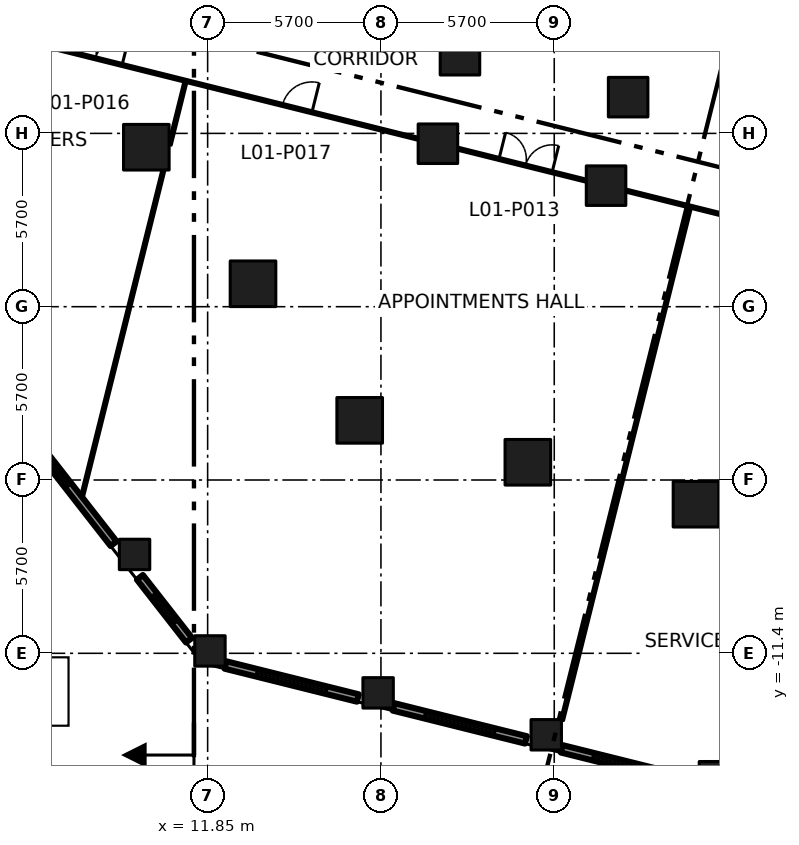
"""IFC4 building model, lengths in metres.
Left out: names, types, materials, properties, quantities, classifications, styles, units other than length and angle.
Written with IfcOpenShell. Run it as: python <this file> out.ifc"""

import sys

from ifc_helpers import new_model, si_unit, direction, frame, frame_2d, origin, origin_2d, place, context, subcontext, project, spatial, rectangle, extrude, element, fill, save


model = new_model("IFC4")
c1 = context("Model", 3, precision=1e-05, world=origin(), true_north=direction((0.0, 1.0)))
c2 = subcontext(c1, "Body", "Model", "MODEL_VIEW")
j1 = project(units=[si_unit("LENGTHUNIT", "METRE"), si_unit("PLANEANGLEUNIT", "RADIAN")], contexts=[c1])
p1 = place(None, origin())
s1 = spatial("IfcSite", under=j1, at=p1, CompositionType="ELEMENT")
p2 = place(p1, origin())
s2 = spatial("IfcBuilding", under=s1, at=p2, CompositionType="ELEMENT")
p3 = place(p2, frame((0.0, 0.0, 7.2)))
s3 = spatial("IfcBuildingStorey", under=s2, at=p3, CompositionType="ELEMENT", Elevation=7.2)
for number, where, z_axis, x_axis in (
    (1, (16.851, -3.738, 0.0), (0.0, 0.0, 1.0), (1.0, 0.0, 0.0)),
    (2, (13.342, 0.754, 0.0), (0.0, 0.0, 1.0), (1.0, 0.0, 0.0)),
    (3, (9.833, 5.245, 0.0), (0.0, 0.0, 1.0), (1.0, 0.0, 0.0)),
    (4, (22.382, -5.117, 0.0), (0.0, 0.0, 1.0), (1.0, 0.0, 0.0)),
    (5, (27.912, -6.496, 0.0), (0.0, 0.0, 1.0), (1.0, 0.0, 0.0)),
):
    element("IfcColumn", number, at=place(p3, frame(where, z_axis=z_axis, x_axis=x_axis)), inside=s3, PredefinedType="COLUMN", context=c2, shape_type="SweptSolid", body=[
        extrude(rectangle(XDim=1.5, YDim=1.5, at=origin_2d()), origin(), (0.0, 0.0, 1.0), 5.4),
    ])
for number, where, z_axis, x_axis in (
    (6, (19.424, 5.36, 0.0), (0.0, 0.0, 1.0), (1.0, 0.0, 0.0)),
    (7, (24.954, 3.981, 0.0), (0.0, 0.0, 1.0), (1.0, 0.0, 0.0)),
    (8, (20.149, 8.271, 0.0), (0.0, 0.0, 1.0), (1.0, 0.0, 0.0)),
    (9, (25.68, 6.892, 0.0), (0.0, 0.0, 1.0), (1.0, 0.0, 0.0)),
):
    element("IfcColumn", number, at=place(p3, frame(where, z_axis=z_axis, x_axis=x_axis)), inside=s3, PredefinedType="COLUMN", context=c2, shape_type="SweptSolid", body=[
        extrude(rectangle(XDim=1.3, YDim=1.3, at=origin_2d()), origin(), (0.0, 0.0, 1.0), 5.4),
    ])
for number, where, z_axis, x_axis in (
    (10, (9.446, -8.148, 0.0), (0.0, 0.0, 1.0), (1.0, 0.0, 0.0)),
    (11, (11.926, -11.322, 0.0), (0.0, 0.0, 1.0), (1.0, 0.0, 0.0)),
    (12, (17.457, -12.701, 0.0), (0.0, 0.0, 1.0), (1.0, 0.0, 0.0)),
    (13, (22.987, -14.08, 0.0), (0.0, 0.0, 1.0), (1.0, 0.0, 0.0)),
    (14, (28.518, -15.459, 0.0), (0.0, 0.0, 1.0), (1.0, 0.0, 0.0)),
):
    element("IfcColumn", number, at=place(p3, frame(where, z_axis=z_axis, x_axis=x_axis)), inside=s3, PredefinedType="COLUMN", context=c2, shape_type="SweptSolid", body=[
        extrude(rectangle(XDim=1.0, YDim=1.0, at=origin_2d()), origin(), (0.0, 0.0, 1.0), 5.4),
    ])
p4 = place(p3, frame((2.395, 9.606, 0.0), z_axis=(0.0, 0.0, 1.0), x_axis=(0.970307527636, -0.241874558011, 0.0)))
e15 = element("IfcWall", 15, at=p4, inside=s3, PredefinedType="PARTITIONING", context=c2, shape_type="SweptSolid", body=[
    extrude(rectangle(XDim=16.859, YDim=0.1, at=frame_2d((8.43, 0.0))), origin(), (0.0, 0.0, 1.0), 4.95),
])
p5 = place(p4, frame((5.045, 0.0, 0.0)))
e16 = element("IfcOpeningElement", 16, at=p5, cuts=e15, PredefinedType="OPENING", context=c2, shape_type="SweptSolid", body=[
    extrude(rectangle(XDim=1.8, YDim=2.1, at=frame_2d((0.9, 1.05))), frame((0.0, 0.06, 0.0), z_axis=(0.0, -1.0, 0.0), x_axis=(1.0, 0.0, 0.0)), (0.0, 0.0, 1.0), 0.12),
])
p6 = place(p4, frame((12.28, 0.0, 0.0)))
e17 = element("IfcOpeningElement", 17, at=p6, cuts=e15, PredefinedType="OPENING", context=c2, shape_type="SweptSolid", body=[
    extrude(rectangle(XDim=1.0, YDim=2.1, at=frame_2d((0.5, 1.05))), frame((0.0, 0.06, 0.0), z_axis=(0.0, -1.0, 0.0), x_axis=(1.0, 0.0, 0.0)), (0.0, 0.0, 1.0), 0.12),
])
p7 = place(p3, frame((20.094, 5.193, 0.0), z_axis=(0.0, 0.0, 1.0), x_axis=(0.970321828551, -0.241817181023, 0.0)))
e18 = element("IfcWall", 18, at=p7, inside=s3, PredefinedType="PARTITIONING", context=c2, shape_type="SweptSolid", body=[
    extrude(rectangle(XDim=4.318, YDim=0.1, at=frame_2d((2.159, 0.0))), origin(), (0.0, 0.0, 1.0), 4.95),
])
p8 = place(p7, frame((1.38, 0.0, 0.0)))
e19 = element("IfcOpeningElement", 19, at=p8, cuts=e18, PredefinedType="OPENING", context=c2, shape_type="SweptSolid", body=[
    extrude(rectangle(XDim=1.8, YDim=2.1, at=frame_2d((0.9, 1.05))), frame((0.0, 0.06, 0.0), z_axis=(0.0, -1.0, 0.0), x_axis=(1.0, 0.0, 0.0)), (0.0, 0.0, 1.0), 0.12),
])
p9 = place(p3, frame((25.624, 3.815, 0.0), z_axis=(0.0, 0.0, 1.0), x_axis=(0.970295255208, -0.241923784941, 0.0)))
e20 = element("IfcWall", 20, at=p9, inside=s3, PredefinedType="PARTITIONING", context=c2, shape_type="SweptSolid", body=[
    extrude(rectangle(XDim=4.319, YDim=0.1, at=frame_2d((2.16, 0.0))), origin(), (0.0, 0.0, 1.0), 4.95),
])
p10 = place(p3, frame((7.716, -6.257, 0.0), z_axis=(0.0, 0.0, 1.0), x_axis=(0.241891576484, 0.970303285177, 0.0)))
e21 = element("IfcWall", 21, at=p10, inside=s3, PredefinedType="PARTITIONING", context=c2, shape_type="SweptSolid", body=[
    extrude(rectangle(XDim=11.061, YDim=0.1, at=frame_2d((5.53, 0.0))), origin(), (0.0, 0.0, 1.0), 4.95),
])
p11 = place(p3, frame((10.603, 5.323, 0.0), z_axis=(0.0, 0.0, 1.0), x_axis=(0.241966521302, 0.970284598749, 0.0)))
e22 = element("IfcWall", 22, at=p11, inside=s3, PredefinedType="PARTITIONING", context=c2, shape_type="SweptSolid", body=[
    extrude(rectangle(XDim=2.12, YDim=0.1, at=frame_2d((1.06, 0.0))), origin(), (0.0, 0.0, 1.0), 4.95),
])
p12 = place(p3, frame((23.507, -13.601, 0.0), z_axis=(0.0, 0.0, 1.0), x_axis=(0.24198959429, 0.970278844588, 0.0)))
e23 = element("IfcWall", 23, at=p12, inside=s3, PredefinedType="PARTITIONING", context=c2, shape_type="SweptSolid", body=[
    extrude(rectangle(XDim=17.36, YDim=0.1, at=frame_2d((8.68, 0.0))), origin(), (0.0, 0.0, 1.0), 4.95),
])
p13 = place(p3, frame((6.113, -4.409, 0.0), z_axis=(0.0, 0.0, 1.0), x_axis=(0.615603242749, -0.788056246417, 0.0)))
e24 = element("IfcWall", 24, at=p13, inside=s3, PredefinedType="SOLIDWALL", context=c2, shape_type="SweptSolid", body=[
    extrude(rectangle(XDim=4.297, YDim=0.25, at=frame_2d((2.148, 0.0))), origin(), (0.0, 0.0, 1.0), 4.05),
])
p14 = place(p13, frame((0.702, 0.0, 0.9)))
e25 = element("IfcOpeningElement", 25, at=p14, cuts=e24, PredefinedType="OPENING", context=c2, shape_type="SweptSolid", body=[
    extrude(rectangle(XDim=1.2, YDim=2.7, at=frame_2d((0.6, 1.35))), frame((0.0, 0.135, 0.0), z_axis=(0.0, -1.0, 0.0), x_axis=(1.0, 0.0, 0.0)), (0.0, 0.0, 1.0), 0.27),
])
p15 = place(p3, frame((9.622, -8.901, 0.0), z_axis=(0.0, 0.0, 1.0), x_axis=(0.615703609525, -0.787977832948, 0.0)))
e26 = element("IfcWall", 26, at=p15, inside=s3, PredefinedType="SOLIDWALL", context=c2, shape_type="SweptSolid", body=[
    extrude(rectangle(XDim=2.625, YDim=0.25, at=frame_2d((1.312, 0.0))), origin(), (0.0, 0.0, 1.0), 4.05),
])
p16 = place(p15, frame((0.712, 0.0, 0.9)))
e27 = element("IfcOpeningElement", 27, at=p16, cuts=e26, PredefinedType="OPENING", context=c2, shape_type="SweptSolid", body=[
    extrude(rectangle(XDim=1.2, YDim=2.7, at=frame_2d((0.6, 1.35))), frame((0.0, 0.135, 0.0), z_axis=(0.0, -1.0, 0.0), x_axis=(1.0, 0.0, 0.0)), (0.0, 0.0, 1.0), 0.27),
])
p17 = place(p3, frame((12.436, -11.784, 0.0), z_axis=(0.0, 0.0, 1.0), x_axis=(0.970263990019, -0.242049147224, 0.0)))
e28 = element("IfcWall", 28, at=p17, inside=s3, PredefinedType="SOLIDWALL", context=c2, shape_type="SweptSolid", body=[
    extrude(rectangle(XDim=4.488, YDim=0.25, at=frame_2d((2.244, 0.0))), origin(), (0.0, 0.0, 1.0), 4.05),
])
p18 = place(p17, frame((1.044, 0.0, 0.9)))
e29 = element("IfcOpeningElement", 29, at=p18, cuts=e28, PredefinedType="OPENING", context=c2, shape_type="SweptSolid", body=[
    extrude(rectangle(XDim=2.4, YDim=2.7, at=frame_2d((1.2, 1.35))), frame((0.0, 0.135, 0.0), z_axis=(0.0, -1.0, 0.0), x_axis=(1.0, 0.0, 0.0)), (0.0, 0.0, 1.0), 0.27),
])
p19 = place(p3, frame((17.967, -13.163, 0.0), z_axis=(0.0, 0.0, 1.0), x_axis=(0.970315118421, -0.24184410467, 0.0)))
e30 = element("IfcWall", 30, at=p19, inside=s3, PredefinedType="SOLIDWALL", context=c2, shape_type="SweptSolid", body=[
    extrude(rectangle(XDim=4.486, YDim=0.25, at=frame_2d((2.243, 0.0))), origin(), (0.0, 0.0, 1.0), 4.05),
])
p20 = place(p19, frame((1.044, 0.0, 0.9)))
e31 = element("IfcOpeningElement", 31, at=p20, cuts=e30, PredefinedType="OPENING", context=c2, shape_type="SweptSolid", body=[
    extrude(rectangle(XDim=2.4, YDim=2.7, at=frame_2d((1.2, 1.35))), frame((0.0, 0.135, 0.0), z_axis=(0.0, -1.0, 0.0), x_axis=(1.0, 0.0, 0.0)), (0.0, 0.0, 1.0), 0.27),
])
p21 = place(p3, frame((23.497, -14.542, 0.0), z_axis=(0.0, 0.0, 1.0), x_axis=(0.970327846266, -0.241793032904, 0.0)))
e32 = element("IfcWall", 32, at=p21, inside=s3, PredefinedType="SOLIDWALL", context=c2, shape_type="SweptSolid", body=[
    extrude(rectangle(XDim=4.487, YDim=0.25, at=frame_2d((2.244, 0.0))), origin(), (0.0, 0.0, 1.0), 4.05),
])
p22 = place(p21, frame((1.044, 0.0, 0.9)))
e33 = element("IfcOpeningElement", 33, at=p22, cuts=e32, PredefinedType="OPENING", context=c2, shape_type="SweptSolid", body=[
    extrude(rectangle(XDim=2.4, YDim=2.7, at=frame_2d((1.2, 1.35))), frame((0.0, 0.135, 0.0), z_axis=(0.0, -1.0, 0.0), x_axis=(1.0, 0.0, 0.0)), (0.0, 0.0, 1.0), 0.27),
])
p23 = place(p8, origin())
e34 = element("IfcDoor", 34, at=p23, inside=s3, OperationType="DOUBLE_DOOR_SINGLE_SWING", PredefinedType="DOOR", context=c2, shape_type="SweptSolid", body=[
    extrude(rectangle(XDim=1.8, YDim=2.1, at=frame_2d((0.9, 1.05))), frame((0.0, 0.025, 0.0), z_axis=(0.0, -1.0, 0.0), x_axis=(1.0, 0.0, 0.0)), (0.0, 0.0, 1.0), 0.05),
])
fill(e19, e34)
p24 = place(p5, origin())
e35 = element("IfcDoor", 35, at=p24, inside=s3, OperationType="DOUBLE_DOOR_SINGLE_SWING", PredefinedType="DOOR", context=c2, shape_type="SweptSolid", body=[
    extrude(rectangle(XDim=1.8, YDim=2.1, at=frame_2d((0.9, 1.05))), frame((0.0, 0.025, 0.0), z_axis=(0.0, -1.0, 0.0), x_axis=(1.0, 0.0, 0.0)), (0.0, 0.0, 1.0), 0.05),
])
fill(e16, e35)
p25 = place(p6, origin())
e36 = element("IfcDoor", 36, at=p25, inside=s3, OperationType="SINGLE_SWING_RIGHT", PredefinedType="DOOR", context=c2, shape_type="SweptSolid", body=[
    extrude(rectangle(XDim=1.0, YDim=2.1, at=frame_2d((0.5, 1.05))), frame((0.0, 0.025, 0.0), z_axis=(0.0, -1.0, 0.0), x_axis=(1.0, 0.0, 0.0)), (0.0, 0.0, 1.0), 0.05),
])
fill(e17, e36)
p26 = place(p14, origin())
e37 = element("IfcWindow", 37, at=p26, inside=s3, PartitioningType="SINGLE_PANEL", PredefinedType="WINDOW", context=c2, shape_type="SweptSolid", body=[
    extrude(rectangle(XDim=1.2, YDim=2.7, at=frame_2d((0.6, 1.35))), frame((0.0, 0.03, 0.0), z_axis=(0.0, -1.0, 0.0), x_axis=(1.0, 0.0, 0.0)), (0.0, 0.0, 1.0), 0.06),
])
fill(e25, e37)
p27 = place(p16, origin())
e38 = element("IfcWindow", 38, at=p27, inside=s3, PartitioningType="SINGLE_PANEL", PredefinedType="WINDOW", context=c2, shape_type="SweptSolid", body=[
    extrude(rectangle(XDim=1.2, YDim=2.7, at=frame_2d((0.6, 1.35))), frame((0.0, 0.03, 0.0), z_axis=(0.0, -1.0, 0.0), x_axis=(1.0, 0.0, 0.0)), (0.0, 0.0, 1.0), 0.06),
])
fill(e27, e38)
p28 = place(p18, origin())
e39 = element("IfcWindow", 39, at=p28, inside=s3, PartitioningType="DOUBLE_PANEL_VERTICAL", PredefinedType="WINDOW", context=c2, shape_type="SweptSolid", body=[
    extrude(rectangle(XDim=2.4, YDim=2.7, at=frame_2d((1.2, 1.35))), frame((0.0, 0.03, 0.0), z_axis=(0.0, -1.0, 0.0), x_axis=(1.0, 0.0, 0.0)), (0.0, 0.0, 1.0), 0.06),
])
fill(e29, e39)
p29 = place(p20, origin())
e40 = element("IfcWindow", 40, at=p29, inside=s3, PartitioningType="DOUBLE_PANEL_VERTICAL", PredefinedType="WINDOW", context=c2, shape_type="SweptSolid", body=[
    extrude(rectangle(XDim=2.4, YDim=2.7, at=frame_2d((1.2, 1.35))), frame((0.0, 0.03, 0.0), z_axis=(0.0, -1.0, 0.0), x_axis=(1.0, 0.0, 0.0)), (0.0, 0.0, 1.0), 0.06),
])
fill(e31, e40)
p30 = place(p22, origin())
e41 = element("IfcWindow", 41, at=p30, inside=s3, PartitioningType="DOUBLE_PANEL_VERTICAL", PredefinedType="WINDOW", context=c2, shape_type="SweptSolid", body=[
    extrude(rectangle(XDim=2.4, YDim=2.7, at=frame_2d((1.2, 1.35))), frame((0.0, 0.03, 0.0), z_axis=(0.0, -1.0, 0.0), x_axis=(1.0, 0.0, 0.0)), (0.0, 0.0, 1.0), 0.06),
])
fill(e33, e41)
save(model, sys.argv[1])
